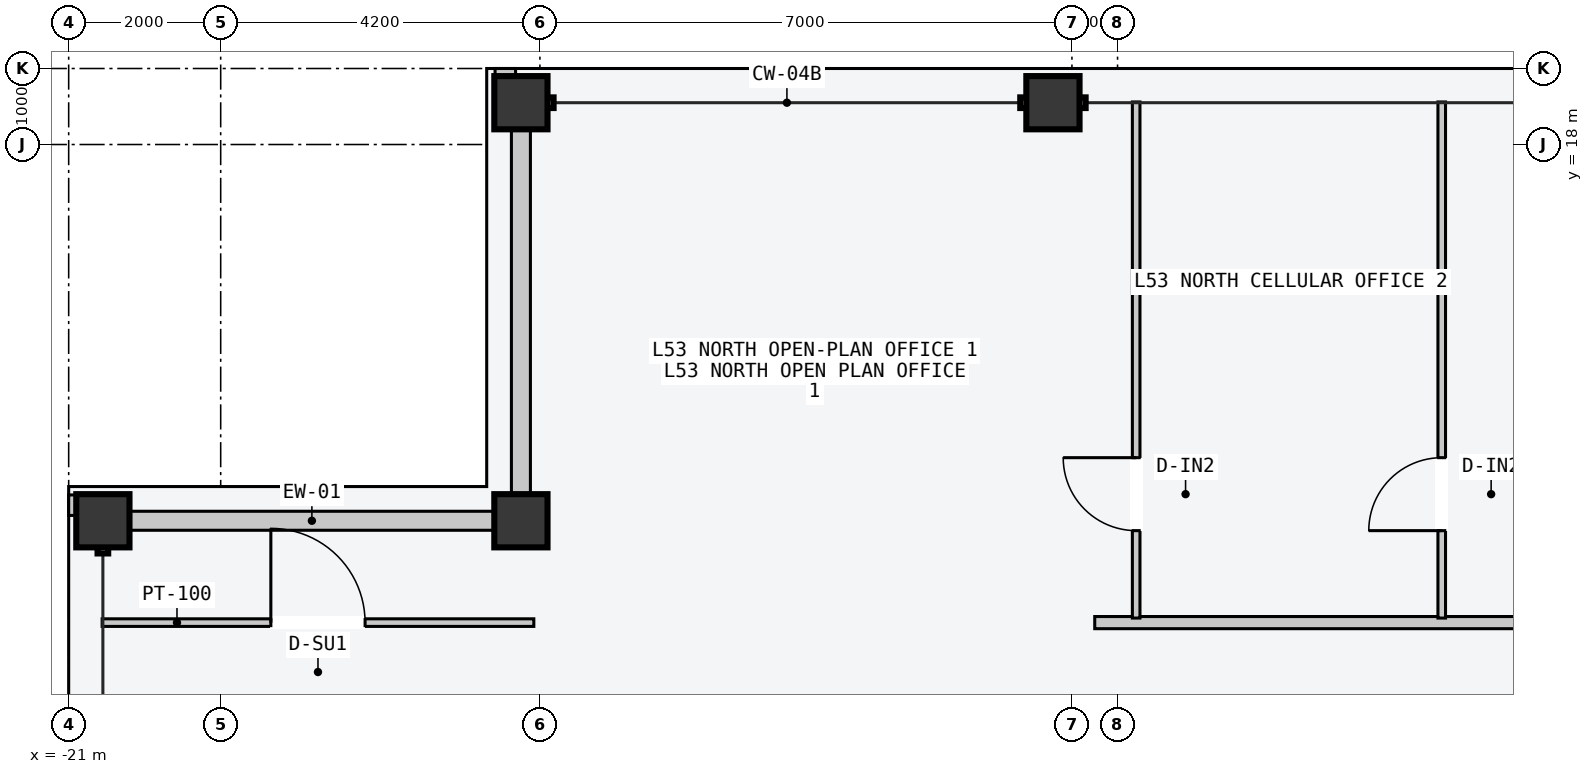
"""IFC4 building model, lengths in metres.
Left out: names, types, materials, properties, quantities, classifications, styles, units other than length and angle.
Written with IfcOpenShell. Run it as: python <this file> out.ifc"""

import sys

from ifc_helpers import new_model, si_unit, direction, frame, frame_2d, origin, origin_2d, place, context, subcontext, project, spatial, rectangle, hollow_rectangle, extrude, element, fill, save


model = new_model("IFC4")
c1 = context("Model", 3, precision=1e-05, world=origin(), true_north=direction((0.0, 1.0)))
c2 = subcontext(c1, "Body", "Model", "MODEL_VIEW")
j1 = project(units=[si_unit("LENGTHUNIT", "METRE"), si_unit("PLANEANGLEUNIT", "RADIAN")], contexts=[c1])
p1 = place(None, origin())
s1 = spatial("IfcSite", under=j1, at=p1, CompositionType="ELEMENT")
p2 = place(p1, origin())
s2 = spatial("IfcBuilding", under=s1, at=p2, CompositionType="ELEMENT")
p3 = place(p2, frame((0.0, 0.0, 201.9)))
s3 = spatial("IfcBuildingStorey", under=s2, at=p3, CompositionType="ELEMENT", Elevation=201.9)
for number, where, z_axis, x_axis in (
    (1, (-15.05, 18.55, 0.0), (0.0, 0.0, 1.0), (1.0, 0.0, 0.0)),
    (2, (-8.05, 18.55, 0.0), (0.0, 0.0, 1.0), (1.0, 0.0, 0.0)),
    (3, (-20.55, 13.05, 0.0), (0.0, 0.0, 1.0), (0.0, 1.0, 0.0)),
    (4, (-15.05, 13.05, 0.0), (0.0, 0.0, 1.0), (1.0, 0.0, 0.0)),
):
    element("IfcColumn", number, at=place(p3, frame(where, z_axis=z_axis, x_axis=x_axis)), inside=s3, PredefinedType="COLUMN", context=c2, shape_type="SweptSolid", body=[
        extrude(hollow_rectangle(XDim=0.7, YDim=0.7, WallThickness=0.03, at=origin_2d()), origin(), (0.0, 0.0, 1.0), 3.6),
    ])
for number, where, z_axis, x_axis in (
    (5, (-20.19, 13.05, 0.0), (0.0, 0.0, 1.0), (1.0, 0.0, 0.0)),
    (6, (-15.05, 13.41, 0.0), (0.0, 0.0, 1.0), (0.0, 1.0, 0.0)),
):
    element("IfcWall", number, at=place(p3, frame(where, z_axis=z_axis, x_axis=x_axis)), inside=s3, PredefinedType="STANDARD", context=c2, shape_type="SweptSolid", body=[
        extrude(rectangle(XDim=4.78, YDim=0.25, at=frame_2d((2.39, 0.0))), origin(), (0.0, 0.0, 1.0), 2.75),
    ])
for number, where, z_axis, x_axis in (
    (7, (-15.39, 18.89, 0.0), (0.0, 0.0, 1.0), (1.0, 0.0, 0.0)),
    (8, (-20.89, 13.12, 0.0), (0.0, 0.0, 1.0), (0.0, 1.0, 0.0)),
):
    element("IfcWall", number, at=place(p3, frame(where, z_axis=z_axis, x_axis=x_axis)), inside=s3, PredefinedType="PARAPET", context=c2, shape_type="SweptSolid", body=[
        extrude(rectangle(XDim=0.27, YDim=0.22, at=frame_2d((0.135, 0.0))), origin(), (0.0, 0.0, 1.0), 1.2),
    ])
p4 = place(p3, frame((-7.5, 11.71, 0.0), z_axis=(0.0, 0.0, 1.0), x_axis=(1.0, 0.0, 0.0)))
e9 = element("IfcWall", 9, at=p4, inside=s3, PredefinedType="PARTITIONING", context=c2, shape_type="SweptSolid", body=[
    extrude(rectangle(XDim=6.24, YDim=0.16, at=frame_2d((3.12, 0.0))), origin(), (0.0, 0.0, 1.0), 3.4),
])
p5 = place(p3, frame((-6.955, 11.77, 0.0), z_axis=(0.0, 0.0, 1.0), x_axis=(0.0, 1.0, 0.0)))
e10 = element("IfcWall", 10, at=p5, inside=s3, PredefinedType="PARTITIONING", context=c2, shape_type="SweptSolid", body=[
    extrude(rectangle(XDim=6.79, YDim=0.1, at=frame_2d((3.395, 0.0))), origin(), (0.0, 0.0, 1.0), 3.4),
])
p6 = place(p5, frame((1.15, 0.0, 0.0)))
e11 = element("IfcOpeningElement", 11, at=p6, cuts=e10, PredefinedType="OPENING", context=c2, shape_type="SweptSolid", body=[
    extrude(rectangle(XDim=0.96, YDim=2.18, at=frame_2d((0.48, 1.09))), frame((0.0, 0.06, 0.0), z_axis=(0.0, -1.0, 0.0), x_axis=(1.0, 0.0, 0.0)), (0.0, 0.0, 1.0), 0.12),
])
p7 = place(p3, frame((-2.935, 11.77, 0.0), z_axis=(0.0, 0.0, 1.0), x_axis=(0.0, 1.0, 0.0)))
e12 = element("IfcWall", 12, at=p7, inside=s3, PredefinedType="PARTITIONING", context=c2, shape_type="SweptSolid", body=[
    extrude(rectangle(XDim=6.79, YDim=0.1, at=frame_2d((3.395, 0.0))), origin(), (0.0, 0.0, 1.0), 3.4),
])
p8 = place(p7, frame((1.15, 0.0, 0.0)))
e13 = element("IfcOpeningElement", 13, at=p8, cuts=e12, PredefinedType="OPENING", context=c2, shape_type="SweptSolid", body=[
    extrude(rectangle(XDim=0.96, YDim=2.18, at=frame_2d((0.48, 1.09))), frame((0.0, 0.06, 0.0), z_axis=(0.0, -1.0, 0.0), x_axis=(1.0, 0.0, 0.0)), (0.0, 0.0, 1.0), 0.12),
])
p9 = place(p3, frame((-20.56, 11.71, 0.0), z_axis=(0.0, 0.0, 1.0), x_axis=(1.0, 0.0, 0.0)))
e14 = element("IfcWall", 14, at=p9, inside=s3, PredefinedType="PARTITIONING", context=c2, shape_type="SweptSolid", body=[
    extrude(rectangle(XDim=5.68, YDim=0.1, at=frame_2d((2.84, 0.0))), origin(), (0.0, 0.0, 1.0), 3.4),
])
p10 = place(p9, frame((2.22, 0.0, 0.0)))
e15 = element("IfcOpeningElement", 15, at=p10, cuts=e14, PredefinedType="OPENING", context=c2, shape_type="SweptSolid", body=[
    extrude(rectangle(XDim=1.24, YDim=2.24, at=frame_2d((0.62, 1.12))), frame((0.0, 0.06, 0.0), z_axis=(0.0, -1.0, 0.0), x_axis=(1.0, 0.0, 0.0)), (0.0, 0.0, 1.0), 0.12),
])
p11 = place(p6, origin())
e16 = element("IfcDoor", 16, at=p11, inside=s3, OperationType="SINGLE_SWING_RIGHT", PredefinedType="DOOR", context=c2, shape_type="SweptSolid", body=[
    extrude(rectangle(XDim=0.96, YDim=2.18, at=frame_2d((0.48, 1.09))), frame((0.0, 0.025, 0.0), z_axis=(0.0, -1.0, 0.0), x_axis=(1.0, 0.0, 0.0)), (0.0, 0.0, 1.0), 0.05),
])
fill(e11, e16)
p12 = place(p8, origin())
e17 = element("IfcDoor", 17, at=p12, inside=s3, OperationType="SINGLE_SWING_LEFT", PredefinedType="DOOR", context=c2, shape_type="SweptSolid", body=[
    extrude(rectangle(XDim=0.96, YDim=2.18, at=frame_2d((0.48, 1.09))), frame((0.0, 0.025, 0.0), z_axis=(0.0, -1.0, 0.0), x_axis=(1.0, 0.0, 0.0)), (0.0, 0.0, 1.0), 0.05),
])
fill(e13, e17)
p13 = place(p10, origin())
e18 = element("IfcDoor", 18, at=p13, inside=s3, OperationType="SINGLE_SWING_LEFT", PredefinedType="DOOR", context=c2, shape_type="SweptSolid", body=[
    extrude(rectangle(XDim=1.24, YDim=2.24, at=frame_2d((0.62, 1.12))), frame((0.0, 0.025, 0.0), z_axis=(0.0, -1.0, 0.0), x_axis=(1.0, 0.0, 0.0)), (0.0, 0.0, 1.0), 0.05),
])
fill(e15, e18)
save(model, sys.argv[1])
